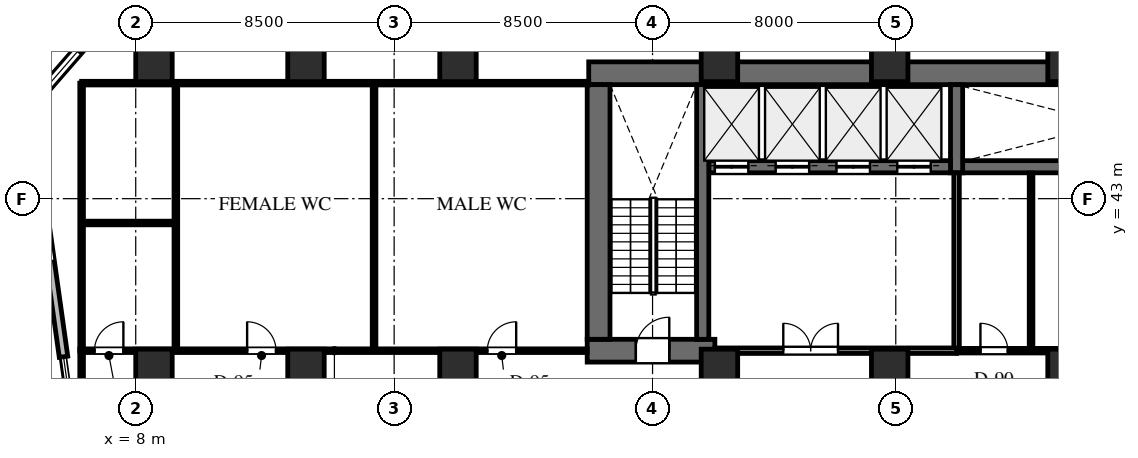
"""IFC4 building model, lengths in metres.
Left out: names, types, materials, properties, quantities, classifications, styles, units other than length and angle.
Written with IfcOpenShell. Run it as: python <this file> out.ifc"""

import sys

from ifc_helpers import new_model, si_unit, direction, frame, frame_2d, origin, origin_2d, place, context, subcontext, project, spatial, rectangle, extrude, element, fill, save


model = new_model("IFC4")
c1 = context("Model", 3, precision=1e-05, world=origin(), true_north=direction((0.0, 1.0)))
c2 = subcontext(c1, "Body", "Model", "MODEL_VIEW")
j1 = project(units=[si_unit("LENGTHUNIT", "METRE"), si_unit("PLANEANGLEUNIT", "RADIAN")], contexts=[c1])
p1 = place(None, origin())
s1 = spatial("IfcSite", under=j1, at=p1, CompositionType="ELEMENT")
p2 = place(p1, origin())
s2 = spatial("IfcBuilding", under=s1, at=p2, CompositionType="ELEMENT")
p3 = place(p2, frame((0.0, 0.0, 45.5)))
s3 = spatial("IfcBuildingStorey", under=s2, at=p3, CompositionType="ELEMENT", Elevation=45.5)
p4 = place(p3, frame((22.9, 47.125, 0.0), z_axis=(0.0, 0.0, 1.0), x_axis=(1.0, 0.0, 0.0)))
e1 = element("IfcWall", 1, at=p4, inside=s3, PredefinedType="SHEAR", context=c2, shape_type="SweptSolid", body=[
    extrude(rectangle(XDim=43.7, YDim=0.75, at=frame_2d((21.85, 0.0))), origin(), (0.0, 0.0, 1.0), 4.0),
])
p5 = place(p3, frame((35.2, 44.05, 0.0), z_axis=(0.0, 0.0, 1.0), x_axis=(1.0, 0.0, 0.0)))
e2 = element("IfcWall", 2, at=p5, inside=s3, PredefinedType="SHEAR", context=c2, shape_type="SweptSolid", body=[
    extrude(rectangle(XDim=9.65, YDim=0.4, at=frame_2d((4.825, 0.0))), origin(), (0.0, 0.0, 1.0), 4.0),
])
p6 = place(p3, frame((35.0, 43.85, 0.0), z_axis=(0.0, 0.0, 1.0), x_axis=(0.0, 1.0, 0.0)))
e3 = element("IfcWall", 3, at=p6, inside=s3, PredefinedType="SHEAR", context=c2, shape_type="SweptSolid", body=[
    extrude(rectangle(XDim=2.9, YDim=0.4, at=frame_2d((1.45, 0.0))), origin(), (0.0, 0.0, 1.0), 4.0),
])
p7 = place(p3, frame((26.85, 44.05, 0.0), z_axis=(0.0, 0.0, 1.0), x_axis=(1.0, 0.0, 0.0)))
e4 = element("IfcWall", 4, at=p7, inside=s3, PredefinedType="SHEAR", context=c2, shape_type="SweptSolid", body=[
    extrude(rectangle(XDim=7.95, YDim=0.4, at=frame_2d((3.975, 0.0))), origin(), (0.0, 0.0, 1.0), 4.0),
])
p8 = place(p7, frame((0.2, 0.0, 0.0)))
e5 = element("IfcOpeningElement", 5, at=p8, cuts=e4, PredefinedType="OPENING", context=c2, shape_type="SweptSolid", body=[
    extrude(rectangle(XDim=1.1, YDim=2.2, at=frame_2d((0.55, 1.1))), frame((0.0, 0.21, 0.0), z_axis=(0.0, -1.0, 0.0), x_axis=(1.0, 0.0, 0.0)), (0.0, 0.0, 1.0), 0.42),
])
p9 = place(p7, frame((2.2, 0.0, 0.0)))
e6 = element("IfcOpeningElement", 6, at=p9, cuts=e4, PredefinedType="OPENING", context=c2, shape_type="SweptSolid", body=[
    extrude(rectangle(XDim=1.1, YDim=2.2, at=frame_2d((0.55, 1.1))), frame((0.0, 0.21, 0.0), z_axis=(0.0, -1.0, 0.0), x_axis=(1.0, 0.0, 0.0)), (0.0, 0.0, 1.0), 0.42),
])
p10 = place(p7, frame((4.2, 0.0, 0.0)))
e7 = element("IfcOpeningElement", 7, at=p10, cuts=e4, PredefinedType="OPENING", context=c2, shape_type="SweptSolid", body=[
    extrude(rectangle(XDim=1.1, YDim=2.2, at=frame_2d((0.55, 1.1))), frame((0.0, 0.21, 0.0), z_axis=(0.0, -1.0, 0.0), x_axis=(1.0, 0.0, 0.0)), (0.0, 0.0, 1.0), 0.42),
])
p11 = place(p7, frame((6.2, 0.0, 0.0)))
e8 = element("IfcOpeningElement", 8, at=p11, cuts=e4, PredefinedType="OPENING", context=c2, shape_type="SweptSolid", body=[
    extrude(rectangle(XDim=1.1, YDim=2.2, at=frame_2d((0.55, 1.1))), frame((0.0, 0.21, 0.0), z_axis=(0.0, -1.0, 0.0), x_axis=(1.0, 0.0, 0.0)), (0.0, 0.0, 1.0), 0.42),
])
p12 = place(p3, frame((22.85, 38.0, 0.0), z_axis=(0.0, 0.0, 1.0), x_axis=(1.0, 0.0, 0.0)))
e9 = element("IfcWall", 9, at=p12, inside=s3, PredefinedType="SHEAR", context=c2, shape_type="SweptSolid", body=[
    extrude(rectangle(XDim=4.2, YDim=0.75, at=frame_2d((2.1, 0.0))), origin(), (0.0, 0.0, 1.0), 4.0),
])
p13 = place(p12, frame((1.6, 0.0, 0.0)))
e10 = element("IfcOpeningElement", 10, at=p13, cuts=e9, PredefinedType="OPENING", context=c2, shape_type="SweptSolid", body=[
    extrude(rectangle(XDim=1.1, YDim=2.2, at=frame_2d((0.55, 1.1))), frame((0.0, 0.385, 0.0), z_axis=(0.0, -1.0, 0.0), x_axis=(1.0, 0.0, 0.0)), (0.0, 0.0, 1.0), 0.77),
])
p14 = place(p3, frame((23.225, 38.375, 0.0), z_axis=(0.0, 0.0, 1.0), x_axis=(0.0, 1.0, 0.0)))
e11 = element("IfcWall", 11, at=p14, inside=s3, PredefinedType="SHEAR", context=c2, shape_type="SweptSolid", body=[
    extrude(rectangle(XDim=8.375, YDim=0.75, at=frame_2d((4.188, 0.0))), origin(), (0.0, 0.0, 1.0), 4.0),
])
p15 = place(p3, frame((26.65, 38.375, 0.0), z_axis=(0.0, 0.0, 1.0), x_axis=(0.0, 1.0, 0.0)))
e12 = element("IfcWall", 12, at=p15, inside=s3, PredefinedType="SHEAR", context=c2, shape_type="SweptSolid", body=[
    extrude(rectangle(XDim=8.375, YDim=0.4, at=frame_2d((4.188, 0.0))), origin(), (0.0, 0.0, 1.0), 4.0),
])
for number, where, z_axis, x_axis in (
    (13, (38.6, 37.35, 0.0), (0.0, 0.0, 1.0), (1.0, 0.0, 0.0)),
    (14, (38.6, 47.55, 0.0), (0.0, 0.0, 1.0), (1.0, 0.0, 0.0)),
    (15, (32.8, 37.35, 0.0), (0.0, 0.0, 1.0), (1.0, 0.0, 0.0)),
    (16, (32.8, 47.55, 0.0), (0.0, 0.0, 1.0), (1.0, 0.0, 0.0)),
    (17, (27.2, 37.35, 0.0), (0.0, 0.0, 1.0), (1.0, 0.0, 0.0)),
    (18, (27.2, 47.55, 0.0), (0.0, 0.0, 1.0), (1.0, 0.0, 0.0)),
    (19, (18.6, 37.35, 0.0), (0.0, 0.0, 1.0), (1.0, 0.0, 0.0)),
    (20, (18.6, 47.55, 0.0), (0.0, 0.0, 1.0), (1.0, 0.0, 0.0)),
    (21, (13.6, 37.35, 0.0), (0.0, 0.0, 1.0), (1.0, 0.0, 0.0)),
    (22, (13.6, 47.55, 0.0), (0.0, 0.0, 1.0), (1.0, 0.0, 0.0)),
    (23, (8.6, 37.35, 0.0), (0.0, 0.0, 1.0), (1.0, 0.0, 0.0)),
    (24, (8.6, 47.55, 0.0), (0.0, 0.0, 1.0), (1.0, 0.0, 0.0)),
):
    element("IfcColumn", number, at=place(p3, frame(where, z_axis=z_axis, x_axis=x_axis)), inside=s3, PredefinedType="COLUMN", context=c2, shape_type="SweptSolid", body=[
        extrude(rectangle(XDim=1.2, YDim=1.4, at=origin_2d()), origin(), (0.0, 0.0, 1.0), 4.0),
    ])
p16 = place(p3, frame((5.625, 37.8, 0.0), z_axis=(0.0, 0.0, 1.0), x_axis=(-0.139180172484, 0.990267074878, 0.0)))
e25 = element("IfcWall", 25, at=p16, inside=s3, PredefinedType="STANDARD", context=c2, shape_type="SweptSolid", body=[
    extrude(rectangle(XDim=8.267, YDim=0.28, at=frame_2d((4.134, 0.0))), origin(), (0.0, 0.0, 1.0), 3.74),
])
p17 = place(p16, frame((3.173, 0.0, 0.65)))
e26 = element("IfcOpeningElement", 26, at=p17, cuts=e25, PredefinedType="OPENING", context=c2, shape_type="SweptSolid", body=[
    extrude(rectangle(XDim=1.8, YDim=2.1, at=frame_2d((0.9, 1.05))), frame((0.0, 0.15, 0.0), z_axis=(0.0, -1.0, 0.0), x_axis=(1.0, 0.0, 0.0)), (0.0, 0.0, 1.0), 0.3),
])
p18 = place(p3, frame((4.474, 45.987, 0.0), z_axis=(0.0, 0.0, 1.0), x_axis=(0.656070053895, 0.754699996278, 0.0)))
e27 = element("IfcWall", 27, at=p18, inside=s3, PredefinedType="STANDARD", context=c2, shape_type="SweptSolid", body=[
    extrude(rectangle(XDim=3.171, YDim=0.28, at=frame_2d((1.585, 0.0))), origin(), (0.0, 0.0, 1.0), 3.74),
])
p19 = place(p18, frame((0.667, 0.0, 0.65)))
e28 = element("IfcOpeningElement", 28, at=p19, cuts=e27, PredefinedType="OPENING", context=c2, shape_type="SweptSolid", body=[
    extrude(rectangle(XDim=1.8, YDim=2.1, at=frame_2d((0.9, 1.05))), frame((0.0, 0.15, 0.0), z_axis=(0.0, -1.0, 0.0), x_axis=(1.0, 0.0, 0.0)), (0.0, 0.0, 1.0), 0.3),
])
p20 = place(p3, frame((35.0, 38.0, 0.0), z_axis=(0.0, 0.0, 1.0), x_axis=(0.0, 1.0, 0.0)))
e29 = element("IfcWall", 29, at=p20, inside=s3, PredefinedType="STANDARD", context=c2, shape_type="SweptSolid", body=[
    extrude(rectangle(XDim=5.85, YDim=0.18, at=frame_2d((2.925, 0.0))), origin(), (0.0, 0.0, 1.0), 3.74),
])
p21 = place(p3, frame((27.05, 38.0, 0.0), z_axis=(0.0, 0.0, 1.0), x_axis=(1.0, 0.0, 0.0)))
e30 = element("IfcWall", 30, at=p21, inside=s3, PredefinedType="STANDARD", context=c2, shape_type="SweptSolid", body=[
    extrude(rectangle(XDim=7.95, YDim=0.18, at=frame_2d((3.975, 0.0))), origin(), (0.0, 0.0, 1.0), 2.813),
])
p22 = place(p21, frame((2.25, 0.0, 0.0)))
e31 = element("IfcOpeningElement", 31, at=p22, cuts=e30, PredefinedType="OPENING", context=c2, shape_type="SweptSolid", body=[
    extrude(rectangle(XDim=1.8, YDim=2.2, at=frame_2d((0.9, 1.1))), frame((0.0, 0.1, 0.0), z_axis=(0.0, -1.0, 0.0), x_axis=(1.0, 0.0, 0.0)), (0.0, 0.0, 1.0), 0.2),
])
p23 = place(p3, frame((35.0, 38.0, 0.0), z_axis=(0.0, 0.0, 1.0), x_axis=(1.0, 0.0, 0.0)))
e32 = element("IfcWall", 32, at=p23, inside=s3, PredefinedType="PARTITIONING", context=c2, shape_type="SweptSolid", body=[
    extrude(rectangle(XDim=10.05, YDim=0.15, at=frame_2d((5.025, 0.0))), origin(), (0.0, 0.0, 1.0), 2.813),
])
p24 = place(p23, frame((0.785, 0.0, 0.0)))
e33 = element("IfcOpeningElement", 33, at=p24, cuts=e32, PredefinedType="OPENING", context=c2, shape_type="SweptSolid", body=[
    extrude(rectangle(XDim=0.9, YDim=2.1, at=frame_2d((0.45, 1.05))), frame((0.0, 0.085, 0.0), z_axis=(0.0, -1.0, 0.0), x_axis=(1.0, 0.0, 0.0)), (0.0, 0.0, 1.0), 0.17),
])
p25 = place(p23, frame((5.3, 0.0, 0.0)))
e34 = element("IfcOpeningElement", 34, at=p25, cuts=e32, PredefinedType="OPENING", context=c2, shape_type="SweptSolid", body=[
    extrude(rectangle(XDim=0.9, YDim=2.1, at=frame_2d((0.45, 1.05))), frame((0.0, 0.085, 0.0), z_axis=(0.0, -1.0, 0.0), x_axis=(1.0, 0.0, 0.0)), (0.0, 0.0, 1.0), 0.17),
])
p26 = place(p23, frame((7.2, 0.0, 0.0)))
e35 = element("IfcOpeningElement", 35, at=p26, cuts=e32, PredefinedType="OPENING", context=c2, shape_type="SweptSolid", body=[
    extrude(rectangle(XDim=0.9, YDim=2.1, at=frame_2d((0.45, 1.05))), frame((0.0, 0.085, 0.0), z_axis=(0.0, -1.0, 0.0), x_axis=(1.0, 0.0, 0.0)), (0.0, 0.0, 1.0), 0.17),
])
p27 = place(p3, frame((37.45, 38.068, 0.0), z_axis=(0.0, 0.0, 1.0), x_axis=(0.0, 1.0, 0.0)))
e36 = element("IfcWall", 36, at=p27, inside=s3, PredefinedType="PARTITIONING", context=c2, shape_type="SweptSolid", body=[
    extrude(rectangle(XDim=5.774, YDim=0.12, at=frame_2d((2.887, 0.0))), origin(), (0.0, 0.0, 1.0), 3.74),
])
p28 = place(p3, frame((6.22, 38.0, 0.0), z_axis=(0.0, 0.0, 1.0), x_axis=(1.0, 0.0, 0.0)))
e37 = element("IfcWall", 37, at=p28, inside=s3, PredefinedType="PARTITIONING", context=c2, shape_type="SweptSolid", body=[
    extrude(rectangle(XDim=16.63, YDim=0.12, at=frame_2d((8.315, 0.0))), origin(), (0.0, 0.0, 1.0), 2.813),
])
p29 = place(p28, frame((0.424, 0.0, 0.0)))
e38 = element("IfcOpeningElement", 38, at=p29, cuts=e37, PredefinedType="OPENING", context=c2, shape_type="SweptSolid", body=[
    extrude(rectangle(XDim=0.95, YDim=2.15, at=frame_2d((0.475, 1.075))), frame((0.0, 0.07, 0.0), z_axis=(0.0, -1.0, 0.0), x_axis=(1.0, 0.0, 0.0)), (0.0, 0.0, 1.0), 0.14),
])
p30 = place(p28, frame((5.444, 0.0, 0.0)))
e39 = element("IfcOpeningElement", 39, at=p30, cuts=e37, PredefinedType="OPENING", context=c2, shape_type="SweptSolid", body=[
    extrude(rectangle(XDim=0.95, YDim=2.15, at=frame_2d((0.475, 1.075))), frame((0.0, 0.07, 0.0), z_axis=(0.0, -1.0, 0.0), x_axis=(1.0, 0.0, 0.0)), (0.0, 0.0, 1.0), 0.14),
])
p31 = place(p28, frame((13.344, 0.0, 0.0)))
e40 = element("IfcOpeningElement", 40, at=p31, cuts=e37, PredefinedType="OPENING", context=c2, shape_type="SweptSolid", body=[
    extrude(rectangle(XDim=0.95, YDim=2.15, at=frame_2d((0.475, 1.075))), frame((0.0, 0.07, 0.0), z_axis=(0.0, -1.0, 0.0), x_axis=(1.0, 0.0, 0.0)), (0.0, 0.0, 1.0), 0.14),
])
p32 = place(p3, frame((6.22, 38.0, 0.0), z_axis=(0.0, 0.0, 1.0), x_axis=(0.0, 1.0, 0.0)))
e41 = element("IfcWall", 41, at=p32, inside=s3, PredefinedType="PARTITIONING", context=c2, shape_type="SweptSolid", body=[
    extrude(rectangle(XDim=8.8, YDim=0.12, at=frame_2d((4.4, 0.0))), origin(), (0.0, 0.0, 1.0), 3.74),
])
p33 = place(p3, frame((6.22, 46.8, 0.0), z_axis=(0.0, 0.0, 1.0), x_axis=(1.0, 0.0, 0.0)))
e42 = element("IfcWall", 42, at=p33, inside=s3, PredefinedType="PARTITIONING", context=c2, shape_type="SweptSolid", body=[
    extrude(rectangle(XDim=16.68, YDim=0.12, at=frame_2d((8.34, 0.0))), origin(), (0.0, 0.0, 1.0), 2.813),
])
for number, where, z_axis, x_axis in (
    (43, (9.32, 38.068, 0.0), (0.0, 0.0, 1.0), (0.0, 1.0, 0.0)),
    (44, (15.84, 38.068, 0.0), (0.0, 0.0, 1.0), (0.0, 1.0, 0.0)),
):
    element("IfcWall", number, at=place(p3, frame(where, z_axis=z_axis, x_axis=x_axis)), inside=s3, PredefinedType="PARTITIONING", context=c2, shape_type="SweptSolid", body=[
        extrude(rectangle(XDim=8.664, YDim=0.12, at=frame_2d((4.332, 0.0))), origin(), (0.0, 0.0, 1.0), 3.74),
    ])
p34 = place(p3, frame((6.288, 42.2, 0.0), z_axis=(0.0, 0.0, 1.0), x_axis=(1.0, 0.0, 0.0)))
e45 = element("IfcWall", 45, at=p34, inside=s3, PredefinedType="PARTITIONING", context=c2, shape_type="SweptSolid", body=[
    extrude(rectangle(XDim=2.964, YDim=0.12, at=frame_2d((1.482, 0.0))), origin(), (0.0, 0.0, 1.0), 2.813),
])
p35 = place(p3, frame((6.22, 34.4, 0.0), z_axis=(0.0, 0.0, 1.0), x_axis=(0.0, 1.0, 0.0)))
e46 = element("IfcWall", 46, at=p35, inside=s3, PredefinedType="PARTITIONING", context=c2, shape_type="SweptSolid", body=[
    extrude(rectangle(XDim=3.65, YDim=0.12, at=frame_2d((1.825, 0.0))), origin(), (0.0, 0.0, 1.0), 3.74),
])
p36 = place(p19, origin())
e47 = element("IfcWindow", 47, at=p36, inside=s3, PartitioningType="SINGLE_PANEL", PredefinedType="WINDOW", context=c2, shape_type="SweptSolid", body=[
    extrude(rectangle(XDim=1.8, YDim=2.1, at=frame_2d((0.9, 1.05))), frame((0.0, 0.03, 0.0), z_axis=(0.0, -1.0, 0.0), x_axis=(1.0, 0.0, 0.0)), (0.0, 0.0, 1.0), 0.06),
])
fill(e28, e47)
p37 = place(p13, origin())
e48 = element("IfcDoor", 48, at=p37, inside=s3, OperationType="SINGLE_SWING_RIGHT", PredefinedType="DOOR", context=c2, shape_type="SweptSolid", body=[
    extrude(rectangle(XDim=1.1, YDim=2.2, at=frame_2d((0.55, 1.1))), frame((0.0, 0.025, 0.0), z_axis=(0.0, -1.0, 0.0), x_axis=(1.0, 0.0, 0.0)), (0.0, 0.0, 1.0), 0.05),
])
fill(e10, e48)
p38 = place(p8, origin())
e49 = element("IfcDoor", 49, at=p38, inside=s3, OperationType="DOUBLE_DOOR_SLIDING", PredefinedType="DOOR", context=c2, shape_type="SweptSolid", body=[
    extrude(rectangle(XDim=1.1, YDim=2.2, at=frame_2d((0.55, 1.1))), frame((0.0, 0.025, 0.0), z_axis=(0.0, -1.0, 0.0), x_axis=(1.0, 0.0, 0.0)), (0.0, 0.0, 1.0), 0.05),
])
fill(e5, e49)
p39 = place(p9, origin())
e50 = element("IfcDoor", 50, at=p39, inside=s3, OperationType="DOUBLE_DOOR_SLIDING", PredefinedType="DOOR", context=c2, shape_type="SweptSolid", body=[
    extrude(rectangle(XDim=1.1, YDim=2.2, at=frame_2d((0.55, 1.1))), frame((0.0, 0.025, 0.0), z_axis=(0.0, -1.0, 0.0), x_axis=(1.0, 0.0, 0.0)), (0.0, 0.0, 1.0), 0.05),
])
fill(e6, e50)
p40 = place(p10, origin())
e51 = element("IfcDoor", 51, at=p40, inside=s3, OperationType="DOUBLE_DOOR_SLIDING", PredefinedType="DOOR", context=c2, shape_type="SweptSolid", body=[
    extrude(rectangle(XDim=1.1, YDim=2.2, at=frame_2d((0.55, 1.1))), frame((0.0, 0.025, 0.0), z_axis=(0.0, -1.0, 0.0), x_axis=(1.0, 0.0, 0.0)), (0.0, 0.0, 1.0), 0.05),
])
fill(e7, e51)
p41 = place(p11, origin())
e52 = element("IfcDoor", 52, at=p41, inside=s3, OperationType="DOUBLE_DOOR_SLIDING", PredefinedType="DOOR", context=c2, shape_type="SweptSolid", body=[
    extrude(rectangle(XDim=1.1, YDim=2.2, at=frame_2d((0.55, 1.1))), frame((0.0, 0.025, 0.0), z_axis=(0.0, -1.0, 0.0), x_axis=(1.0, 0.0, 0.0)), (0.0, 0.0, 1.0), 0.05),
])
fill(e8, e52)
p42 = place(p22, origin())
e53 = element("IfcDoor", 53, at=p42, inside=s3, OperationType="DOUBLE_DOOR_SINGLE_SWING", PredefinedType="DOOR", context=c2, shape_type="SweptSolid", body=[
    extrude(rectangle(XDim=1.8, YDim=2.2, at=frame_2d((0.9, 1.1))), frame((0.0, 0.025, 0.0), z_axis=(0.0, -1.0, 0.0), x_axis=(1.0, 0.0, 0.0)), (0.0, 0.0, 1.0), 0.05),
])
fill(e31, e53)
p43 = place(p24, origin())
e54 = element("IfcDoor", 54, at=p43, inside=s3, OperationType="SINGLE_SWING_LEFT", PredefinedType="DOOR", context=c2, shape_type="SweptSolid", body=[
    extrude(rectangle(XDim=0.9, YDim=2.1, at=frame_2d((0.45, 1.05))), frame((0.0, 0.025, 0.0), z_axis=(0.0, -1.0, 0.0), x_axis=(1.0, 0.0, 0.0)), (0.0, 0.0, 1.0), 0.05),
])
fill(e33, e54)
p44 = place(p29, origin())
e55 = element("IfcDoor", 55, at=p44, inside=s3, OperationType="SINGLE_SWING_RIGHT", PredefinedType="DOOR", context=c2, shape_type="SweptSolid", body=[
    extrude(rectangle(XDim=0.95, YDim=2.15, at=frame_2d((0.475, 1.075))), frame((0.0, 0.025, 0.0), z_axis=(0.0, -1.0, 0.0), x_axis=(1.0, 0.0, 0.0)), (0.0, 0.0, 1.0), 0.05),
])
fill(e38, e55)
p45 = place(p30, origin())
e56 = element("IfcDoor", 56, at=p45, inside=s3, OperationType="SINGLE_SWING_LEFT", PredefinedType="DOOR", context=c2, shape_type="SweptSolid", body=[
    extrude(rectangle(XDim=0.95, YDim=2.15, at=frame_2d((0.475, 1.075))), frame((0.0, 0.025, 0.0), z_axis=(0.0, -1.0, 0.0), x_axis=(1.0, 0.0, 0.0)), (0.0, 0.0, 1.0), 0.05),
])
fill(e39, e56)
p46 = place(p31, origin())
e57 = element("IfcDoor", 57, at=p46, inside=s3, OperationType="SINGLE_SWING_RIGHT", PredefinedType="DOOR", context=c2, shape_type="SweptSolid", body=[
    extrude(rectangle(XDim=0.95, YDim=2.15, at=frame_2d((0.475, 1.075))), frame((0.0, 0.025, 0.0), z_axis=(0.0, -1.0, 0.0), x_axis=(1.0, 0.0, 0.0)), (0.0, 0.0, 1.0), 0.05),
])
fill(e40, e57)
save(model, sys.argv[1])
